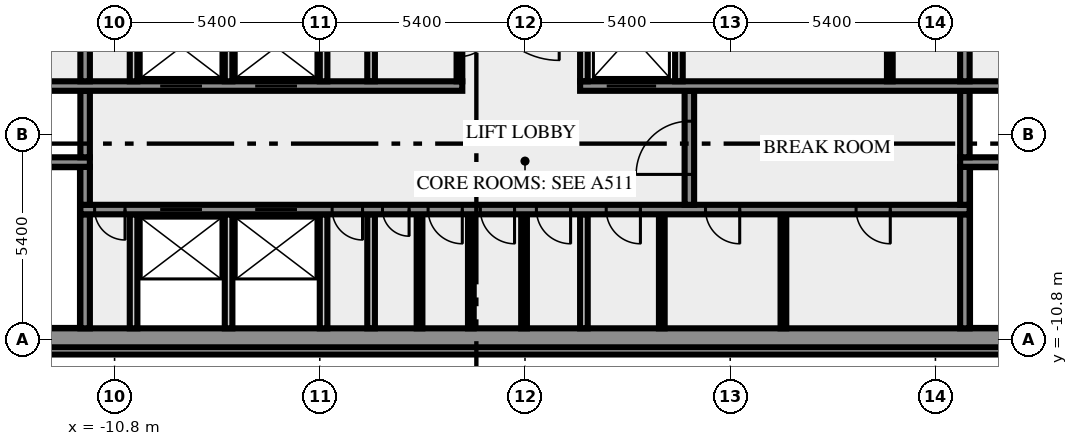
"""IFC4 building model, lengths in metres.
Left out: names, types, materials, properties, quantities, classifications, styles, units other than length and angle.
Written with IfcOpenShell. Run it as: python <this file> out.ifc"""

import sys

from ifc_helpers import new_model, si_unit, direction, frame, frame_2d, origin, place, context, subcontext, project, spatial, rectangle, extrude, element, fill, save


model = new_model("IFC4")
c1 = context("Model", 3, precision=1e-05, world=origin(), true_north=direction((0.0, 1.0)))
c2 = subcontext(c1, "Body", "Model", "MODEL_VIEW")
j1 = project(units=[si_unit("LENGTHUNIT", "METRE"), si_unit("PLANEANGLEUNIT", "RADIAN")], contexts=[c1])
p1 = place(None, origin())
s1 = spatial("IfcSite", under=j1, at=p1, CompositionType="ELEMENT")
p2 = place(p1, origin())
s2 = spatial("IfcBuilding", under=s1, at=p2, CompositionType="ELEMENT")
p3 = place(p2, frame((0.0, 0.0, 281.0)))
s3 = spatial("IfcBuildingStorey", under=s2, at=p3, CompositionType="ELEMENT", Elevation=281.0)
p4 = place(p3, frame((-17.444, -11.088, 0.0), z_axis=(0.0, 0.0, 1.0), x_axis=(1.0, 0.0, 0.0)))
e1 = element("IfcWall", 1, at=p4, inside=s3, PredefinedType="SOLIDWALL", context=c2, shape_type="SweptSolid", body=[
    extrude(rectangle(XDim=34.888, YDim=0.2, at=frame_2d((17.444, 0.0))), origin(), (0.0, 0.0, 1.0), 3.65),
])
p5 = place(p3, frame((-20.0, -10.75, 0.0), z_axis=(0.0, 0.0, 1.0), x_axis=(1.0, 0.0, 0.0)))
e2 = element("IfcWall", 2, at=p5, inside=s3, PredefinedType="SHEAR", context=c2, shape_type="SweptSolid", body=[
    extrude(rectangle(XDim=40.0, YDim=0.5, at=frame_2d((20.0, 0.0))), origin(), (0.0, 0.0, 1.0), 3.65),
])
p6 = place(p5, frame((0.8, 0.0, 1.0)))
e3 = element("IfcOpeningElement", 3, at=p6, cuts=e2, PredefinedType="OPENING", context=c2, shape_type="SweptSolid", body=[
    extrude(rectangle(XDim=1.2, YDim=1.2, at=frame_2d((0.6, 0.6))), frame((0.0, 0.26, 0.0), z_axis=(0.0, -1.0, 0.0), x_axis=(1.0, 0.0, 0.0)), (0.0, 0.0, 1.0), 0.52),
])
p7 = place(p5, frame((38.0, 0.0, 1.0)))
e4 = element("IfcOpeningElement", 4, at=p7, cuts=e2, PredefinedType="OPENING", context=c2, shape_type="SweptSolid", body=[
    extrude(rectangle(XDim=1.2, YDim=1.2, at=frame_2d((0.6, 0.6))), frame((0.0, 0.26, 0.0), z_axis=(0.0, -1.0, 0.0), x_axis=(1.0, 0.0, 0.0)), (0.0, 0.0, 1.0), 0.52),
])
p8 = place(p3, frame((-11.575, -10.5, 0.0), z_axis=(0.0, 0.0, 1.0), x_axis=(0.0, 1.0, 0.0)))
e5 = element("IfcWall", 5, at=p8, inside=s3, PredefinedType="SHEAR", context=c2, shape_type="SweptSolid", body=[
    extrude(rectangle(XDim=3.0, YDim=0.25, at=frame_2d((1.5, 0.0))), origin(), (0.0, 0.0, 1.0), 3.65),
])
for number, where, z_axis, x_axis in (
    (6, (-10.3, -10.5, 0.0), (0.0, 0.0, 1.0), (0.0, 1.0, 0.0)),
    (7, (-7.8, -10.5, 0.0), (0.0, 0.0, 1.0), (0.0, 1.0, 0.0)),
    (8, (-5.3, -10.5, 0.0), (0.0, 0.0, 1.0), (0.0, 1.0, 0.0)),
    (9, (-4.05, -10.5, 0.0), (0.0, 0.0, 1.0), (0.0, 1.0, 0.0)),
):
    element("IfcWall", number, at=place(p3, frame(where, z_axis=z_axis, x_axis=x_axis)), inside=s3, PredefinedType="SOLIDWALL", context=c2, shape_type="SweptSolid", body=[
        extrude(rectangle(XDim=3.0, YDim=0.2, at=frame_2d((1.5, 0.0))), origin(), (0.0, 0.0, 1.0), 3.65),
    ])
for number, where, z_axis, x_axis in (
    (10, (-2.775, -10.5, 0.0), (0.0, 0.0, 1.0), (0.0, 1.0, 0.0)),
    (11, (-1.425, -10.5, 0.0), (0.0, 0.0, 1.0), (0.0, 1.0, 0.0)),
    (12, (-0.025, -10.5, 0.0), (0.0, 0.0, 1.0), (0.0, 1.0, 0.0)),
):
    element("IfcWall", number, at=place(p3, frame(where, z_axis=z_axis, x_axis=x_axis)), inside=s3, PredefinedType="PARTITIONING", context=c2, shape_type="SweptSolid", body=[
        extrude(rectangle(XDim=3.0, YDim=0.15, at=frame_2d((1.5, 0.0))), origin(), (0.0, 0.0, 1.0), 3.65),
    ])
p9 = place(p3, frame((1.55, -10.5, 0.0), z_axis=(0.0, 0.0, 1.0), x_axis=(0.0, 1.0, 0.0)))
e13 = element("IfcWall", 13, at=p9, inside=s3, PredefinedType="SOLIDWALL", context=c2, shape_type="SweptSolid", body=[
    extrude(rectangle(XDim=3.0, YDim=0.2, at=frame_2d((1.5, 0.0))), origin(), (0.0, 0.0, 1.0), 3.65),
])
for number, where, z_axis, x_axis in (
    (14, (3.6, -10.5, 0.0), (0.0, 0.0, 1.0), (0.0, 1.0, 0.0)),
    (15, (6.8, -10.5, 0.0), (0.0, 0.0, 1.0), (0.0, 1.0, 0.0)),
):
    element("IfcWall", number, at=place(p3, frame(where, z_axis=z_axis, x_axis=x_axis)), inside=s3, PredefinedType="PARTITIONING", context=c2, shape_type="SweptSolid", body=[
        extrude(rectangle(XDim=3.0, YDim=0.15, at=frame_2d((1.5, 0.0))), origin(), (0.0, 0.0, 1.0), 3.65),
    ])
p10 = place(p3, frame((11.575, -10.5, 0.0), z_axis=(0.0, 0.0, 1.0), x_axis=(0.0, 1.0, 0.0)))
e16 = element("IfcWall", 16, at=p10, inside=s3, PredefinedType="SHEAR", context=c2, shape_type="SweptSolid", body=[
    extrude(rectangle(XDim=3.0, YDim=0.25, at=frame_2d((1.5, 0.0))), origin(), (0.0, 0.0, 1.0), 3.65),
])
p11 = place(p3, frame((11.7, -7.375, 0.0), z_axis=(0.0, 0.0, 1.0), x_axis=(-1.0, 0.0, 0.0)))
e17 = element("IfcWall", 17, at=p11, inside=s3, PredefinedType="SHEAR", context=c2, shape_type="SweptSolid", body=[
    extrude(rectangle(XDim=23.4, YDim=0.25, at=frame_2d((11.7, 0.0))), origin(), (0.0, 0.0, 1.0), 3.65),
])
p12 = place(p11, frame((22.225, 0.0, 0.0)))
e18 = element("IfcOpeningElement", 18, at=p12, cuts=e17, PredefinedType="OPENING", context=c2, shape_type="SweptSolid", body=[
    extrude(rectangle(XDim=0.8, YDim=2.1, at=frame_2d((0.4, 1.05))), frame((0.0, 0.135, 0.0), z_axis=(0.0, -1.0, 0.0), x_axis=(1.0, 0.0, 0.0)), (0.0, 0.0, 1.0), 0.27),
])
p13 = place(p11, frame((20.2, 0.0, 0.0)))
e19 = element("IfcOpeningElement", 19, at=p13, cuts=e17, PredefinedType="OPENING", context=c2, shape_type="SweptSolid", body=[
    extrude(rectangle(XDim=1.1, YDim=2.1, at=frame_2d((0.55, 1.05))), frame((0.0, 0.135, 0.0), z_axis=(0.0, -1.0, 0.0), x_axis=(1.0, 0.0, 0.0)), (0.0, 0.0, 1.0), 0.27),
])
p14 = place(p11, frame((17.7, 0.0, 0.0)))
e20 = element("IfcOpeningElement", 20, at=p14, cuts=e17, PredefinedType="OPENING", context=c2, shape_type="SweptSolid", body=[
    extrude(rectangle(XDim=1.1, YDim=2.1, at=frame_2d((0.55, 1.05))), frame((0.0, 0.135, 0.0), z_axis=(0.0, -1.0, 0.0), x_axis=(1.0, 0.0, 0.0)), (0.0, 0.0, 1.0), 0.27),
])
p15 = place(p11, frame((15.975, 0.0, 0.0)))
e21 = element("IfcOpeningElement", 21, at=p15, cuts=e17, PredefinedType="OPENING", context=c2, shape_type="SweptSolid", body=[
    extrude(rectangle(XDim=0.8, YDim=2.1, at=frame_2d((0.4, 1.05))), frame((0.0, 0.135, 0.0), z_axis=(0.0, -1.0, 0.0), x_axis=(1.0, 0.0, 0.0)), (0.0, 0.0, 1.0), 0.27),
])
p16 = place(p11, frame((14.75, 0.0, 0.0)))
e22 = element("IfcOpeningElement", 22, at=p16, cuts=e17, PredefinedType="OPENING", context=c2, shape_type="SweptSolid", body=[
    extrude(rectangle(XDim=0.7, YDim=2.1, at=frame_2d((0.35, 1.05))), frame((0.0, 0.135, 0.0), z_axis=(0.0, -1.0, 0.0), x_axis=(1.0, 0.0, 0.0)), (0.0, 0.0, 1.0), 0.27),
])
p17 = place(p11, frame((13.35, 0.0, 0.0)))
e23 = element("IfcOpeningElement", 23, at=p17, cuts=e17, PredefinedType="OPENING", context=c2, shape_type="SweptSolid", body=[
    extrude(rectangle(XDim=0.9, YDim=2.1, at=frame_2d((0.45, 1.05))), frame((0.0, 0.135, 0.0), z_axis=(0.0, -1.0, 0.0), x_axis=(1.0, 0.0, 0.0)), (0.0, 0.0, 1.0), 0.27),
])
p18 = place(p11, frame((11.975, 0.0, 0.0)))
e24 = element("IfcOpeningElement", 24, at=p18, cuts=e17, PredefinedType="OPENING", context=c2, shape_type="SweptSolid", body=[
    extrude(rectangle(XDim=0.9, YDim=2.1, at=frame_2d((0.45, 1.05))), frame((0.0, 0.135, 0.0), z_axis=(0.0, -1.0, 0.0), x_axis=(1.0, 0.0, 0.0)), (0.0, 0.0, 1.0), 0.27),
])
p19 = place(p11, frame((10.5, 0.0, 0.0)))
e25 = element("IfcOpeningElement", 25, at=p19, cuts=e17, PredefinedType="OPENING", context=c2, shape_type="SweptSolid", body=[
    extrude(rectangle(XDim=0.9, YDim=2.1, at=frame_2d((0.45, 1.05))), frame((0.0, 0.135, 0.0), z_axis=(0.0, -1.0, 0.0), x_axis=(1.0, 0.0, 0.0)), (0.0, 0.0, 1.0), 0.27),
])
p20 = place(p11, frame((8.663, 0.0, 0.0)))
e26 = element("IfcOpeningElement", 26, at=p20, cuts=e17, PredefinedType="OPENING", context=c2, shape_type="SweptSolid", body=[
    extrude(rectangle(XDim=0.9, YDim=2.1, at=frame_2d((0.45, 1.05))), frame((0.0, 0.135, 0.0), z_axis=(0.0, -1.0, 0.0), x_axis=(1.0, 0.0, 0.0)), (0.0, 0.0, 1.0), 0.27),
])
p21 = place(p11, frame((6.05, 0.0, 0.0)))
e27 = element("IfcOpeningElement", 27, at=p21, cuts=e17, PredefinedType="OPENING", context=c2, shape_type="SweptSolid", body=[
    extrude(rectangle(XDim=0.9, YDim=2.1, at=frame_2d((0.45, 1.05))), frame((0.0, 0.135, 0.0), z_axis=(0.0, -1.0, 0.0), x_axis=(1.0, 0.0, 0.0)), (0.0, 0.0, 1.0), 0.27),
])
p22 = place(p11, frame((2.088, 0.0, 0.0)))
e28 = element("IfcOpeningElement", 28, at=p22, cuts=e17, PredefinedType="OPENING", context=c2, shape_type="SweptSolid", body=[
    extrude(rectangle(XDim=0.9, YDim=2.1, at=frame_2d((0.45, 1.05))), frame((0.0, 0.135, 0.0), z_axis=(0.0, -1.0, 0.0), x_axis=(1.0, 0.0, 0.0)), (0.0, 0.0, 1.0), 0.27),
])
p23 = place(p3, frame((-11.575, -7.25, 0.0), z_axis=(0.0, 0.0, 1.0), x_axis=(0.0, 1.0, 0.0)))
e29 = element("IfcWall", 29, at=p23, inside=s3, PredefinedType="SHEAR", context=c2, shape_type="SweptSolid", body=[
    extrude(rectangle(XDim=1.0, YDim=0.25, at=frame_2d((0.5, 0.0))), origin(), (0.0, 0.0, 1.0), 3.65),
])
p24 = place(p3, frame((4.325, -7.25, 0.0), z_axis=(0.0, 0.0, 1.0), x_axis=(0.0, 1.0, 0.0)))
e30 = element("IfcWall", 30, at=p24, inside=s3, PredefinedType="SHEAR", context=c2, shape_type="SweptSolid", body=[
    extrude(rectangle(XDim=3.0, YDim=0.25, at=frame_2d((1.5, 0.0))), origin(), (0.0, 0.0, 1.0), 3.65),
])
p25 = place(p24, frame((0.8, 0.0, 0.0)))
e31 = element("IfcOpeningElement", 31, at=p25, cuts=e30, PredefinedType="OPENING", context=c2, shape_type="SweptSolid", body=[
    extrude(rectangle(XDim=1.4, YDim=2.1, at=frame_2d((0.7, 1.05))), frame((0.0, 0.135, 0.0), z_axis=(0.0, -1.0, 0.0), x_axis=(1.0, 0.0, 0.0)), (0.0, 0.0, 1.0), 0.27),
])
p26 = place(p3, frame((11.575, -7.25, 0.0), z_axis=(0.0, 0.0, 1.0), x_axis=(0.0, 1.0, 0.0)))
e32 = element("IfcWall", 32, at=p26, inside=s3, PredefinedType="SHEAR", context=c2, shape_type="SweptSolid", body=[
    extrude(rectangle(XDim=1.0, YDim=0.25, at=frame_2d((0.5, 0.0))), origin(), (0.0, 0.0, 1.0), 3.65),
])
p27 = place(p3, frame((-11.45, -6.125, 0.0), z_axis=(0.0, 0.0, 1.0), x_axis=(-1.0, 0.0, 0.0)))
e33 = element("IfcWall", 33, at=p27, inside=s3, PredefinedType="SHEAR", context=c2, shape_type="SweptSolid", body=[
    extrude(rectangle(XDim=8.05, YDim=0.25, at=frame_2d((4.025, 0.0))), origin(), (0.0, 0.0, 1.0), 3.65),
])
p28 = place(p27, frame((6.2, 0.0, 0.0)))
e34 = element("IfcOpeningElement", 34, at=p28, cuts=e33, PredefinedType="OPENING", context=c2, shape_type="SweptSolid", body=[
    extrude(rectangle(XDim=1.8, YDim=2.1, at=frame_2d((0.9, 1.05))), frame((0.0, 0.135, 0.0), z_axis=(0.0, -1.0, 0.0), x_axis=(1.0, 0.0, 0.0)), (0.0, 0.0, 1.0), 0.27),
])
p29 = place(p3, frame((19.5, -6.125, 0.0), z_axis=(0.0, 0.0, 1.0), x_axis=(-1.0, 0.0, 0.0)))
e35 = element("IfcWall", 35, at=p29, inside=s3, PredefinedType="SHEAR", context=c2, shape_type="SweptSolid", body=[
    extrude(rectangle(XDim=8.05, YDim=0.25, at=frame_2d((4.025, 0.0))), origin(), (0.0, 0.0, 1.0), 3.65),
])
p30 = place(p29, frame((0.05, 0.0, 0.0)))
e36 = element("IfcOpeningElement", 36, at=p30, cuts=e35, PredefinedType="OPENING", context=c2, shape_type="SweptSolid", body=[
    extrude(rectangle(XDim=1.8, YDim=2.1, at=frame_2d((0.9, 1.05))), frame((0.0, 0.135, 0.0), z_axis=(0.0, -1.0, 0.0), x_axis=(1.0, 0.0, 0.0)), (0.0, 0.0, 1.0), 0.27),
])
for number, where, z_axis, x_axis in (
    (37, (-11.575, -6.0, 0.0), (0.0, 0.0, 1.0), (0.0, 1.0, 0.0)),
    (38, (11.575, -6.0, 0.0), (0.0, 0.0, 1.0), (0.0, 1.0, 0.0)),
):
    element("IfcWall", number, at=place(p3, frame(where, z_axis=z_axis, x_axis=x_axis)), inside=s3, PredefinedType="SHEAR", context=c2, shape_type="SweptSolid", body=[
        extrude(rectangle(XDim=1.75, YDim=0.25, at=frame_2d((0.875, 0.0))), origin(), (0.0, 0.0, 1.0), 3.65),
    ])
p31 = place(p3, frame((-14.35, -4.125, 0.0), z_axis=(0.0, 0.0, 1.0), x_axis=(1.0, 0.0, 0.0)))
e39 = element("IfcWall", 39, at=p31, inside=s3, PredefinedType="SHEAR", context=c2, shape_type="SweptSolid", body=[
    extrude(rectangle(XDim=12.7, YDim=0.25, at=frame_2d((6.35, 0.0))), origin(), (0.0, 0.0, 1.0), 3.65),
])
p32 = place(p31, frame((4.75, 0.0, 0.0)))
e40 = element("IfcOpeningElement", 40, at=p32, cuts=e39, PredefinedType="OPENING", context=c2, shape_type="SweptSolid", body=[
    extrude(rectangle(XDim=1.1, YDim=2.1, at=frame_2d((0.55, 1.05))), frame((0.0, 0.135, 0.0), z_axis=(0.0, -1.0, 0.0), x_axis=(1.0, 0.0, 0.0)), (0.0, 0.0, 1.0), 0.27),
])
p33 = place(p31, frame((7.25, 0.0, 0.0)))
e41 = element("IfcOpeningElement", 41, at=p33, cuts=e39, PredefinedType="OPENING", context=c2, shape_type="SweptSolid", body=[
    extrude(rectangle(XDim=1.1, YDim=2.1, at=frame_2d((0.55, 1.05))), frame((0.0, 0.135, 0.0), z_axis=(0.0, -1.0, 0.0), x_axis=(1.0, 0.0, 0.0)), (0.0, 0.0, 1.0), 0.27),
])
p34 = place(p3, frame((1.45, -4.125, 0.0), z_axis=(0.0, 0.0, 1.0), x_axis=(1.0, 0.0, 0.0)))
e42 = element("IfcWall", 42, at=p34, inside=s3, PredefinedType="SHEAR", context=c2, shape_type="SweptSolid", body=[
    extrude(rectangle(XDim=12.9, YDim=0.25, at=frame_2d((6.45, 0.0))), origin(), (0.0, 0.0, 1.0), 3.65),
])
p35 = place(p34, frame((0.7, 0.0, 0.0)))
e43 = element("IfcOpeningElement", 43, at=p35, cuts=e42, PredefinedType="OPENING", context=c2, shape_type="SweptSolid", body=[
    extrude(rectangle(XDim=1.3, YDim=2.1, at=frame_2d((0.65, 1.05))), frame((0.0, 0.135, 0.0), z_axis=(0.0, -1.0, 0.0), x_axis=(1.0, 0.0, 0.0)), (0.0, 0.0, 1.0), 0.27),
])
p36 = place(p3, frame((-11.575, -4.0, 0.0), z_axis=(0.0, 0.0, 1.0), x_axis=(0.0, 1.0, 0.0)))
e44 = element("IfcWall", 44, at=p36, inside=s3, PredefinedType="SHEAR", context=c2, shape_type="SweptSolid", body=[
    extrude(rectangle(XDim=2.3, YDim=0.25, at=frame_2d((1.15, 0.0))), origin(), (0.0, 0.0, 1.0), 3.65),
])
for number, where, z_axis, x_axis in (
    (45, (-10.3, -4.0, 0.0), (0.0, 0.0, 1.0), (0.0, 1.0, 0.0)),
    (46, (-7.8, -4.0, 0.0), (0.0, 0.0, 1.0), (0.0, 1.0, 0.0)),
    (47, (-5.3, -4.0, 0.0), (0.0, 0.0, 1.0), (0.0, 1.0, 0.0)),
    (48, (-4.05, -4.0, 0.0), (0.0, 0.0, 1.0), (0.0, 1.0, 0.0)),
):
    element("IfcWall", number, at=place(p3, frame(where, z_axis=z_axis, x_axis=x_axis)), inside=s3, PredefinedType="SOLIDWALL", context=c2, shape_type="SweptSolid", body=[
        extrude(rectangle(XDim=2.3, YDim=0.2, at=frame_2d((1.15, 0.0))), origin(), (0.0, 0.0, 1.0), 3.65),
    ])
p37 = place(p3, frame((-1.725, -1.7, 0.0), z_axis=(0.0, 0.0, 1.0), x_axis=(0.0, -1.0, 0.0)))
e49 = element("IfcWall", 49, at=p37, inside=s3, PredefinedType="PARTITIONING", context=c2, shape_type="SweptSolid", body=[
    extrude(rectangle(XDim=2.3, YDim=0.15, at=frame_2d((1.15, 0.0))), origin(), (0.0, 0.0, 1.0), 3.65),
])
p38 = place(p37, frame((0.75, 0.0, 0.0)))
e50 = element("IfcOpeningElement", 50, at=p38, cuts=e49, PredefinedType="OPENING", context=c2, shape_type="SweptSolid", body=[
    extrude(rectangle(XDim=0.9, YDim=2.1, at=frame_2d((0.45, 1.05))), frame((0.0, 0.085, 0.0), z_axis=(0.0, -1.0, 0.0), x_axis=(1.0, 0.0, 0.0)), (0.0, 0.0, 1.0), 0.17),
])
for number, where, z_axis, x_axis in (
    (51, (1.55, -4.0, 0.0), (0.0, 0.0, 1.0), (0.0, 1.0, 0.0)),
    (52, (4.05, -4.0, 0.0), (0.0, 0.0, 1.0), (0.0, 1.0, 0.0)),
):
    element("IfcWall", number, at=place(p3, frame(where, z_axis=z_axis, x_axis=x_axis)), inside=s3, PredefinedType="SOLIDWALL", context=c2, shape_type="SweptSolid", body=[
        extrude(rectangle(XDim=2.3, YDim=0.2, at=frame_2d((1.15, 0.0))), origin(), (0.0, 0.0, 1.0), 3.65),
    ])
p39 = place(p3, frame((9.6, -4.0, 0.0), z_axis=(0.0, 0.0, 1.0), x_axis=(0.0, 1.0, 0.0)))
e53 = element("IfcWall", 53, at=p39, inside=s3, PredefinedType="PARTITIONING", context=c2, shape_type="SweptSolid", body=[
    extrude(rectangle(XDim=2.3, YDim=0.15, at=frame_2d((1.15, 0.0))), origin(), (0.0, 0.0, 1.0), 3.65),
])
p40 = place(p3, frame((11.575, -4.0, 0.0), z_axis=(0.0, 0.0, 1.0), x_axis=(0.0, 1.0, 0.0)))
e54 = element("IfcWall", 54, at=p40, inside=s3, PredefinedType="SHEAR", context=c2, shape_type="SweptSolid", body=[
    extrude(rectangle(XDim=2.3, YDim=0.25, at=frame_2d((1.15, 0.0))), origin(), (0.0, 0.0, 1.0), 3.65),
])
p41 = place(p12, origin())
e55 = element("IfcDoor", 55, at=p41, inside=s3, OperationType="SINGLE_SWING_RIGHT", PredefinedType="DOOR", context=c2, shape_type="SweptSolid", body=[
    extrude(rectangle(XDim=0.8, YDim=2.1, at=frame_2d((0.4, 1.05))), frame((0.0, 0.025, 0.0), z_axis=(0.0, -1.0, 0.0), x_axis=(1.0, 0.0, 0.0)), (0.0, 0.0, 1.0), 0.05),
])
fill(e18, e55)
p42 = place(p13, origin())
e56 = element("IfcDoor", 56, at=p42, inside=s3, OperationType="DOUBLE_DOOR_SLIDING", PredefinedType="DOOR", context=c2, shape_type="SweptSolid", body=[
    extrude(rectangle(XDim=1.1, YDim=2.1, at=frame_2d((0.55, 1.05))), frame((0.0, 0.025, 0.0), z_axis=(0.0, -1.0, 0.0), x_axis=(1.0, 0.0, 0.0)), (0.0, 0.0, 1.0), 0.05),
])
fill(e19, e56)
p43 = place(p14, origin())
e57 = element("IfcDoor", 57, at=p43, inside=s3, OperationType="DOUBLE_DOOR_SLIDING", PredefinedType="DOOR", context=c2, shape_type="SweptSolid", body=[
    extrude(rectangle(XDim=1.1, YDim=2.1, at=frame_2d((0.55, 1.05))), frame((0.0, 0.025, 0.0), z_axis=(0.0, -1.0, 0.0), x_axis=(1.0, 0.0, 0.0)), (0.0, 0.0, 1.0), 0.05),
])
fill(e20, e57)
p44 = place(p15, origin())
e58 = element("IfcDoor", 58, at=p44, inside=s3, OperationType="SINGLE_SWING_RIGHT", PredefinedType="DOOR", context=c2, shape_type="SweptSolid", body=[
    extrude(rectangle(XDim=0.8, YDim=2.1, at=frame_2d((0.4, 1.05))), frame((0.0, 0.025, 0.0), z_axis=(0.0, -1.0, 0.0), x_axis=(1.0, 0.0, 0.0)), (0.0, 0.0, 1.0), 0.05),
])
fill(e21, e58)
p45 = place(p16, origin())
e59 = element("IfcDoor", 59, at=p45, inside=s3, OperationType="SINGLE_SWING_RIGHT", PredefinedType="DOOR", context=c2, shape_type="SweptSolid", body=[
    extrude(rectangle(XDim=0.7, YDim=2.1, at=frame_2d((0.35, 1.05))), frame((0.0, 0.025, 0.0), z_axis=(0.0, -1.0, 0.0), x_axis=(1.0, 0.0, 0.0)), (0.0, 0.0, 1.0), 0.05),
])
fill(e22, e59)
p46 = place(p17, origin())
e60 = element("IfcDoor", 60, at=p46, inside=s3, OperationType="SINGLE_SWING_RIGHT", PredefinedType="DOOR", context=c2, shape_type="SweptSolid", body=[
    extrude(rectangle(XDim=0.9, YDim=2.1, at=frame_2d((0.45, 1.05))), frame((0.0, 0.025, 0.0), z_axis=(0.0, -1.0, 0.0), x_axis=(1.0, 0.0, 0.0)), (0.0, 0.0, 1.0), 0.05),
])
fill(e23, e60)
p47 = place(p18, origin())
e61 = element("IfcDoor", 61, at=p47, inside=s3, OperationType="SINGLE_SWING_RIGHT", PredefinedType="DOOR", context=c2, shape_type="SweptSolid", body=[
    extrude(rectangle(XDim=0.9, YDim=2.1, at=frame_2d((0.45, 1.05))), frame((0.0, 0.025, 0.0), z_axis=(0.0, -1.0, 0.0), x_axis=(1.0, 0.0, 0.0)), (0.0, 0.0, 1.0), 0.05),
])
fill(e24, e61)
p48 = place(p19, origin())
e62 = element("IfcDoor", 62, at=p48, inside=s3, OperationType="SINGLE_SWING_LEFT", PredefinedType="DOOR", context=c2, shape_type="SweptSolid", body=[
    extrude(rectangle(XDim=0.9, YDim=2.1, at=frame_2d((0.45, 1.05))), frame((0.0, 0.025, 0.0), z_axis=(0.0, -1.0, 0.0), x_axis=(1.0, 0.0, 0.0)), (0.0, 0.0, 1.0), 0.05),
])
fill(e25, e62)
p49 = place(p20, origin())
e63 = element("IfcDoor", 63, at=p49, inside=s3, OperationType="SINGLE_SWING_LEFT", PredefinedType="DOOR", context=c2, shape_type="SweptSolid", body=[
    extrude(rectangle(XDim=0.9, YDim=2.1, at=frame_2d((0.45, 1.05))), frame((0.0, 0.025, 0.0), z_axis=(0.0, -1.0, 0.0), x_axis=(1.0, 0.0, 0.0)), (0.0, 0.0, 1.0), 0.05),
])
fill(e26, e63)
p50 = place(p21, origin())
e64 = element("IfcDoor", 64, at=p50, inside=s3, OperationType="SINGLE_SWING_LEFT", PredefinedType="DOOR", context=c2, shape_type="SweptSolid", body=[
    extrude(rectangle(XDim=0.9, YDim=2.1, at=frame_2d((0.45, 1.05))), frame((0.0, 0.025, 0.0), z_axis=(0.0, -1.0, 0.0), x_axis=(1.0, 0.0, 0.0)), (0.0, 0.0, 1.0), 0.05),
])
fill(e27, e64)
p51 = place(p22, origin())
e65 = element("IfcDoor", 65, at=p51, inside=s3, OperationType="SINGLE_SWING_LEFT", PredefinedType="DOOR", context=c2, shape_type="SweptSolid", body=[
    extrude(rectangle(XDim=0.9, YDim=2.1, at=frame_2d((0.45, 1.05))), frame((0.0, 0.025, 0.0), z_axis=(0.0, -1.0, 0.0), x_axis=(1.0, 0.0, 0.0)), (0.0, 0.0, 1.0), 0.05),
])
fill(e28, e65)
p52 = place(p25, origin())
e66 = element("IfcDoor", 66, at=p52, inside=s3, OperationType="DOUBLE_DOOR_SINGLE_SWING", PredefinedType="DOOR", context=c2, shape_type="SweptSolid", body=[
    extrude(rectangle(XDim=1.4, YDim=2.1, at=frame_2d((0.7, 1.05))), frame((0.0, 0.025, 0.0), z_axis=(0.0, -1.0, 0.0), x_axis=(1.0, 0.0, 0.0)), (0.0, 0.0, 1.0), 0.05),
])
fill(e31, e66)
p53 = place(p32, origin())
e67 = element("IfcDoor", 67, at=p53, inside=s3, OperationType="DOUBLE_DOOR_SLIDING", PredefinedType="DOOR", context=c2, shape_type="SweptSolid", body=[
    extrude(rectangle(XDim=1.1, YDim=2.1, at=frame_2d((0.55, 1.05))), frame((0.0, 0.025, 0.0), z_axis=(0.0, -1.0, 0.0), x_axis=(1.0, 0.0, 0.0)), (0.0, 0.0, 1.0), 0.05),
])
fill(e40, e67)
p54 = place(p33, origin())
e68 = element("IfcDoor", 68, at=p54, inside=s3, OperationType="DOUBLE_DOOR_SLIDING", PredefinedType="DOOR", context=c2, shape_type="SweptSolid", body=[
    extrude(rectangle(XDim=1.1, YDim=2.1, at=frame_2d((0.55, 1.05))), frame((0.0, 0.025, 0.0), z_axis=(0.0, -1.0, 0.0), x_axis=(1.0, 0.0, 0.0)), (0.0, 0.0, 1.0), 0.05),
])
fill(e41, e68)
p55 = place(p35, origin())
e69 = element("IfcDoor", 69, at=p55, inside=s3, OperationType="DOUBLE_DOOR_SLIDING", PredefinedType="DOOR", context=c2, shape_type="SweptSolid", body=[
    extrude(rectangle(XDim=1.3, YDim=2.1, at=frame_2d((0.65, 1.05))), frame((0.0, 0.025, 0.0), z_axis=(0.0, -1.0, 0.0), x_axis=(1.0, 0.0, 0.0)), (0.0, 0.0, 1.0), 0.05),
])
fill(e43, e69)
p56 = place(p38, origin())
e70 = element("IfcDoor", 70, at=p56, inside=s3, OperationType="SINGLE_SWING_RIGHT", PredefinedType="DOOR", context=c2, shape_type="SweptSolid", body=[
    extrude(rectangle(XDim=0.9, YDim=2.1, at=frame_2d((0.45, 1.05))), frame((0.0, 0.025, 0.0), z_axis=(0.0, -1.0, 0.0), x_axis=(1.0, 0.0, 0.0)), (0.0, 0.0, 1.0), 0.05),
])
fill(e50, e70)
save(model, sys.argv[1])
